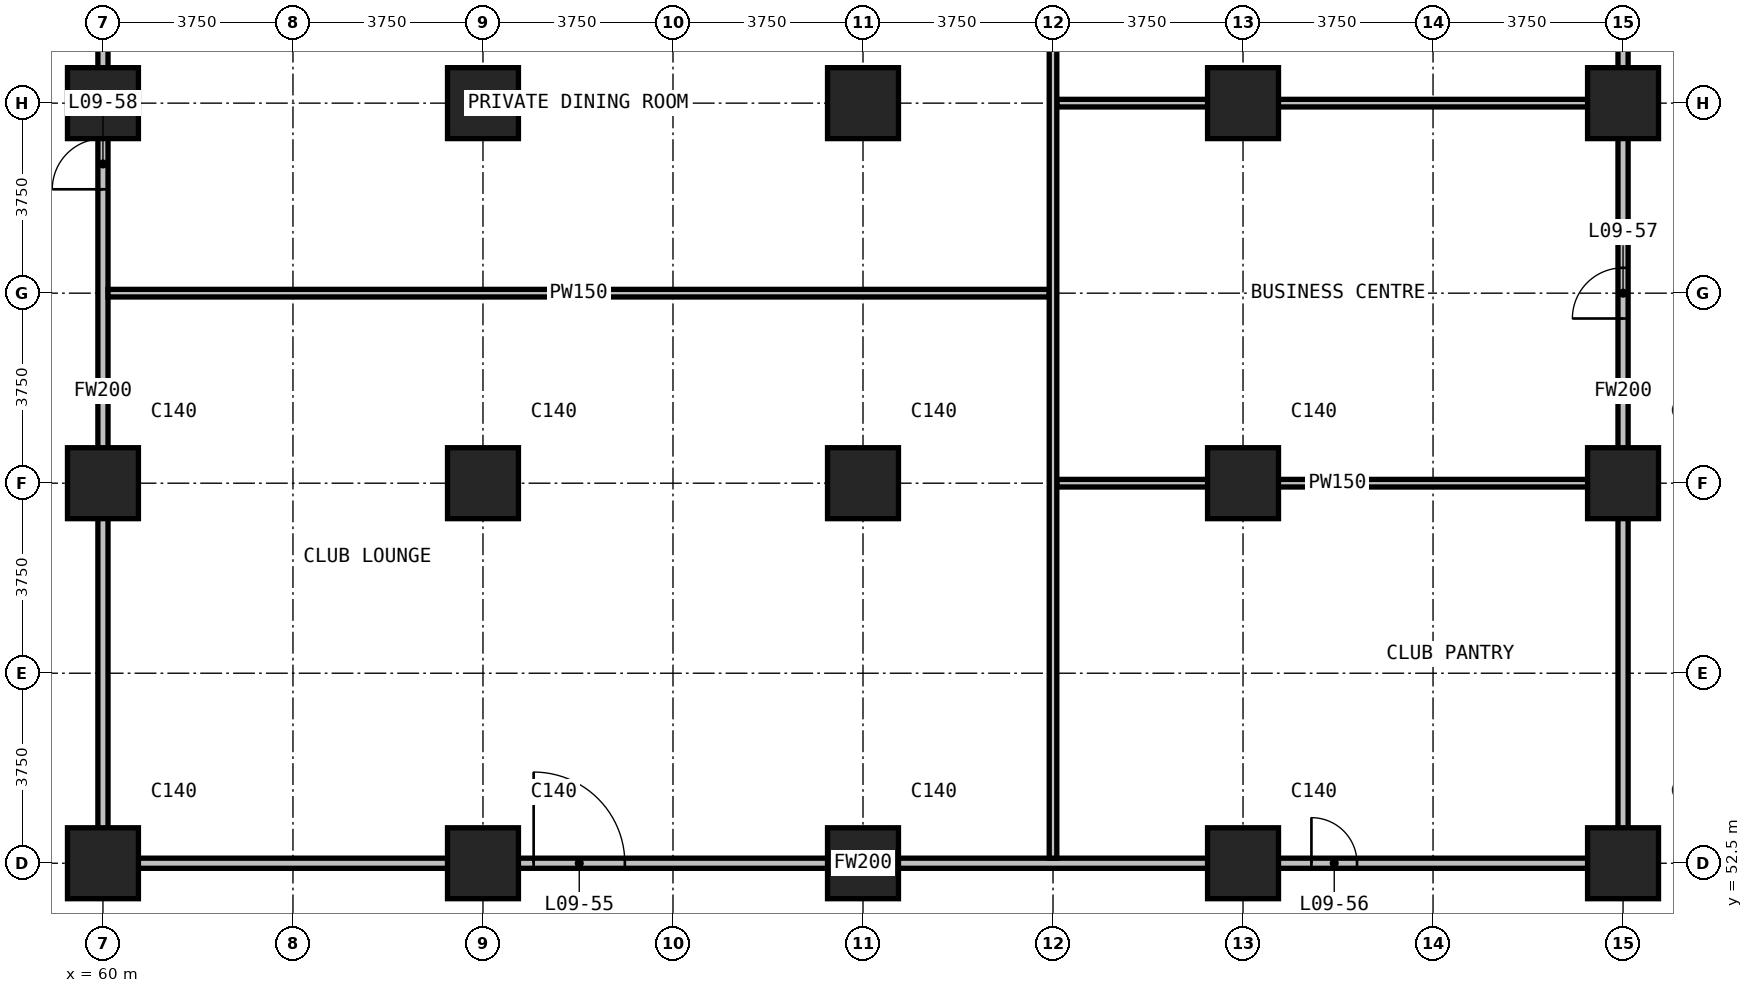
"""IFC4 building model, lengths in metres.
Left out: names, types, materials, properties, quantities, classifications, styles, units other than length and angle.
Written with IfcOpenShell. Run it as: python <this file> out.ifc"""

import sys

from ifc_helpers import new_model, si_unit, direction, frame, frame_2d, origin, origin_2d, place, context, subcontext, project, spatial, rectangle, extrude, element, fill, save


model = new_model("IFC4")
c1 = context("Model", 3, precision=1e-05, world=origin(), true_north=direction((0.0, 1.0)))
c2 = subcontext(c1, "Body", "Model", "MODEL_VIEW")
j1 = project(units=[si_unit("LENGTHUNIT", "METRE"), si_unit("PLANEANGLEUNIT", "RADIAN")], contexts=[c1])
p1 = place(None, origin())
s1 = spatial("IfcSite", under=j1, at=p1, CompositionType="ELEMENT")
p2 = place(p1, origin())
s2 = spatial("IfcBuilding", under=s1, at=p2, CompositionType="ELEMENT")
p3 = place(p2, frame((0.0, 0.0, 49.4)))
s3 = spatial("IfcBuildingStorey", under=s2, at=p3, CompositionType="ELEMENT", Elevation=49.4)
for number, where, z_axis, x_axis in (
    (1, (60.0, 52.5, 0.0), (0.0, 0.0, 1.0), (1.0, 0.0, 0.0)),
    (2, (60.0, 60.0, 0.0), (0.0, 0.0, 1.0), (1.0, 0.0, 0.0)),
    (3, (60.0, 67.5, 0.0), (0.0, 0.0, 1.0), (1.0, 0.0, 0.0)),
    (4, (67.5, 52.5, 0.0), (0.0, 0.0, 1.0), (1.0, 0.0, 0.0)),
    (5, (67.5, 60.0, 0.0), (0.0, 0.0, 1.0), (1.0, 0.0, 0.0)),
    (6, (67.5, 67.5, 0.0), (0.0, 0.0, 1.0), (1.0, 0.0, 0.0)),
    (7, (75.0, 52.5, 0.0), (0.0, 0.0, 1.0), (1.0, 0.0, 0.0)),
    (8, (75.0, 60.0, 0.0), (0.0, 0.0, 1.0), (1.0, 0.0, 0.0)),
    (9, (75.0, 67.5, 0.0), (0.0, 0.0, 1.0), (1.0, 0.0, 0.0)),
    (10, (82.5, 52.5, 0.0), (0.0, 0.0, 1.0), (1.0, 0.0, 0.0)),
    (11, (82.5, 60.0, 0.0), (0.0, 0.0, 1.0), (1.0, 0.0, 0.0)),
    (12, (82.5, 67.5, 0.0), (0.0, 0.0, 1.0), (1.0, 0.0, 0.0)),
    (13, (90.0, 52.5, 0.0), (0.0, 0.0, 1.0), (1.0, 0.0, 0.0)),
    (14, (90.0, 60.0, 0.0), (0.0, 0.0, 1.0), (1.0, 0.0, 0.0)),
    (15, (90.0, 67.5, 0.0), (0.0, 0.0, 1.0), (1.0, 0.0, 0.0)),
):
    element("IfcColumn", number, at=place(p3, frame(where, z_axis=z_axis, x_axis=x_axis)), inside=s3, PredefinedType="COLUMN", context=c2, shape_type="SweptSolid", body=[
        extrude(rectangle(XDim=1.4, YDim=1.4, at=origin_2d()), origin(), (0.0, 0.0, 1.0), 3.3),
    ])
p4 = place(p3, frame((60.1, 52.5, 0.0), z_axis=(0.0, 0.0, 1.0), x_axis=(1.0, 0.0, 0.0)))
e16 = element("IfcWall", 16, at=p4, inside=s3, PredefinedType="PARTITIONING", context=c2, shape_type="SweptSolid", body=[
    extrude(rectangle(XDim=29.8, YDim=0.2, at=frame_2d((14.9, 0.0))), origin(), (0.0, 0.0, 1.0), 3.0),
])
p5 = place(p4, frame((8.4, 0.0, 0.0)))
e17 = element("IfcOpeningElement", 17, at=p5, cuts=e16, PredefinedType="OPENING", context=c2, shape_type="SweptSolid", body=[
    extrude(rectangle(XDim=1.8, YDim=2.2, at=frame_2d((0.9, 1.1))), frame((0.0, 0.11, 0.0), z_axis=(0.0, -1.0, 0.0), x_axis=(1.0, 0.0, 0.0)), (0.0, 0.0, 1.0), 0.22),
])
p6 = place(p4, frame((23.75, 0.0, 0.0)))
e18 = element("IfcOpeningElement", 18, at=p6, cuts=e16, PredefinedType="OPENING", context=c2, shape_type="SweptSolid", body=[
    extrude(rectangle(XDim=0.9, YDim=2.2, at=frame_2d((0.45, 1.1))), frame((0.0, 0.11, 0.0), z_axis=(0.0, -1.0, 0.0), x_axis=(1.0, 0.0, 0.0)), (0.0, 0.0, 1.0), 0.22),
])
p7 = place(p3, frame((60.0, 52.4, 0.0), z_axis=(0.0, 0.0, 1.0), x_axis=(0.0, 1.0, 0.0)))
e19 = element("IfcWall", 19, at=p7, inside=s3, PredefinedType="PARTITIONING", context=c2, shape_type="SweptSolid", body=[
    extrude(rectangle(XDim=18.84, YDim=0.2, at=frame_2d((9.42, 0.0))), origin(), (0.0, 0.0, 1.0), 3.0),
])
p8 = place(p7, frame((13.4, 0.0, 0.0)))
e20 = element("IfcOpeningElement", 20, at=p8, cuts=e19, PredefinedType="OPENING", context=c2, shape_type="SweptSolid", body=[
    extrude(rectangle(XDim=1.0, YDim=2.2, at=frame_2d((0.5, 1.1))), frame((0.0, 0.11, 0.0), z_axis=(0.0, -1.0, 0.0), x_axis=(1.0, 0.0, 0.0)), (0.0, 0.0, 1.0), 0.22),
])
p9 = place(p3, frame((90.0, 52.4, 0.0), z_axis=(0.0, 0.0, 1.0), x_axis=(0.0, 1.0, 0.0)))
e21 = element("IfcWall", 21, at=p9, inside=s3, PredefinedType="PARTITIONING", context=c2, shape_type="SweptSolid", body=[
    extrude(rectangle(XDim=18.84, YDim=0.2, at=frame_2d((9.42, 0.0))), origin(), (0.0, 0.0, 1.0), 3.0),
])
p10 = place(p9, frame((10.85, 0.0, 0.0)))
e22 = element("IfcOpeningElement", 22, at=p10, cuts=e21, PredefinedType="OPENING", context=c2, shape_type="SweptSolid", body=[
    extrude(rectangle(XDim=1.0, YDim=2.2, at=frame_2d((0.5, 1.1))), frame((0.0, 0.11, 0.0), z_axis=(0.0, -1.0, 0.0), x_axis=(1.0, 0.0, 0.0)), (0.0, 0.0, 1.0), 0.22),
])
p11 = place(p9, frame((16.5, 0.0, 0.0)))
e23 = element("IfcOpeningElement", 23, at=p11, cuts=e21, PredefinedType="OPENING", context=c2, shape_type="SweptSolid", body=[
    extrude(rectangle(XDim=0.9, YDim=2.2, at=frame_2d((0.45, 1.1))), frame((0.0, 0.11, 0.0), z_axis=(0.0, -1.0, 0.0), x_axis=(1.0, 0.0, 0.0)), (0.0, 0.0, 1.0), 0.22),
])
p12 = place(p3, frame((78.825, 60.0, 0.0), z_axis=(0.0, 0.0, 1.0), x_axis=(1.0, 0.0, 0.0)))
e24 = element("IfcWall", 24, at=p12, inside=s3, PredefinedType="PARTITIONING", context=c2, shape_type="SweptSolid", body=[
    extrude(rectangle(XDim=11.075, YDim=0.15, at=frame_2d((5.538, 0.0))), origin(), (0.0, 0.0, 1.0), 3.0),
])
p13 = place(p3, frame((60.1, 63.75, 0.0), z_axis=(0.0, 0.0, 1.0), x_axis=(1.0, 0.0, 0.0)))
e25 = element("IfcWall", 25, at=p13, inside=s3, PredefinedType="PARTITIONING", context=c2, shape_type="SweptSolid", body=[
    extrude(rectangle(XDim=18.575, YDim=0.15, at=frame_2d((9.288, 0.0))), origin(), (0.0, 0.0, 1.0), 3.0),
])
p14 = place(p3, frame((78.825, 67.5, 0.0), z_axis=(0.0, 0.0, 1.0), x_axis=(1.0, 0.0, 0.0)))
e26 = element("IfcWall", 26, at=p14, inside=s3, PredefinedType="PARTITIONING", context=c2, shape_type="SweptSolid", body=[
    extrude(rectangle(XDim=11.075, YDim=0.15, at=frame_2d((5.538, 0.0))), origin(), (0.0, 0.0, 1.0), 3.0),
])
p15 = place(p3, frame((78.75, 52.6, 0.0), z_axis=(0.0, 0.0, 1.0), x_axis=(0.0, 1.0, 0.0)))
e27 = element("IfcWall", 27, at=p15, inside=s3, PredefinedType="PARTITIONING", context=c2, shape_type="SweptSolid", body=[
    extrude(rectangle(XDim=18.64, YDim=0.15, at=frame_2d((9.32, 0.0))), origin(), (0.0, 0.0, 1.0), 3.0),
])
p16 = place(p5, origin())
e28 = element("IfcDoor", 28, at=p16, inside=s3, OperationType="DOUBLE_DOOR_SINGLE_SWING", PredefinedType="DOOR", context=c2, shape_type="SweptSolid", body=[
    extrude(rectangle(XDim=1.8, YDim=2.2, at=frame_2d((0.9, 1.1))), frame((0.0, 0.025, 0.0), z_axis=(0.0, -1.0, 0.0), x_axis=(1.0, 0.0, 0.0)), (0.0, 0.0, 1.0), 0.05),
])
fill(e17, e28)
p17 = place(p6, origin())
e29 = element("IfcDoor", 29, at=p17, inside=s3, OperationType="SINGLE_SWING_RIGHT", PredefinedType="DOOR", context=c2, shape_type="SweptSolid", body=[
    extrude(rectangle(XDim=0.9, YDim=2.2, at=frame_2d((0.45, 1.1))), frame((0.0, 0.025, 0.0), z_axis=(0.0, -1.0, 0.0), x_axis=(1.0, 0.0, 0.0)), (0.0, 0.0, 1.0), 0.05),
])
fill(e18, e29)
p18 = place(p10, origin())
e30 = element("IfcDoor", 30, at=p18, inside=s3, OperationType="SINGLE_SWING_LEFT", PredefinedType="DOOR", context=c2, shape_type="SweptSolid", body=[
    extrude(rectangle(XDim=1.0, YDim=2.2, at=frame_2d((0.5, 1.1))), frame((0.0, 0.025, 0.0), z_axis=(0.0, -1.0, 0.0), x_axis=(1.0, 0.0, 0.0)), (0.0, 0.0, 1.0), 0.05),
])
fill(e22, e30)
p19 = place(p8, origin())
e31 = element("IfcDoor", 31, at=p19, inside=s3, OperationType="SINGLE_SWING_LEFT", PredefinedType="DOOR", context=c2, shape_type="SweptSolid", body=[
    extrude(rectangle(XDim=1.0, YDim=2.2, at=frame_2d((0.5, 1.1))), frame((0.0, 0.025, 0.0), z_axis=(0.0, -1.0, 0.0), x_axis=(1.0, 0.0, 0.0)), (0.0, 0.0, 1.0), 0.05),
])
fill(e20, e31)
save(model, sys.argv[1])
